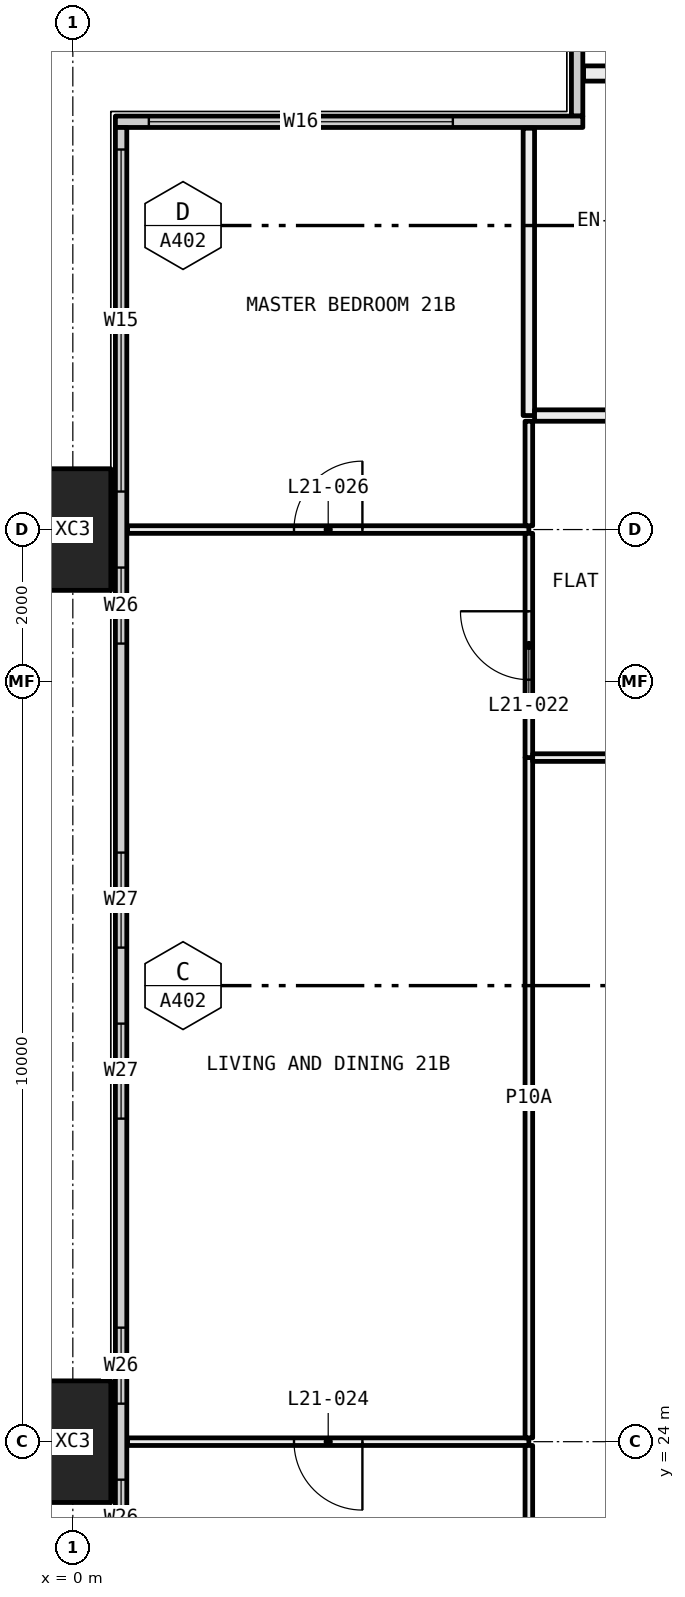
"""IFC4 building model, lengths in metres.
Left out: names, types, materials, properties, quantities, classifications, styles, units other than length and angle.
Written with IfcOpenShell. Run it as: python <this file> out.ifc"""

import sys

from ifc_helpers import new_model, si_unit, direction, frame, frame_2d, origin, origin_2d, place, context, subcontext, project, spatial, rectangle, hollow_rectangle, extrude, element, fill, save


model = new_model("IFC4")
c1 = context("Model", 3, precision=1e-05, world=origin(), true_north=direction((0.0, 1.0)))
c2 = subcontext(c1, "Body", "Model", "MODEL_VIEW")
j1 = project(units=[si_unit("LENGTHUNIT", "METRE"), si_unit("PLANEANGLEUNIT", "RADIAN")], contexts=[c1])
p1 = place(None, origin())
s1 = spatial("IfcSite", under=j1, at=p1, CompositionType="ELEMENT")
p2 = place(p1, origin())
s2 = spatial("IfcBuilding", under=s1, at=p2, CompositionType="ELEMENT")
p3 = place(p2, frame((0.0, 0.0, 85.2)))
s3 = spatial("IfcBuildingStorey", under=s2, at=p3, CompositionType="ELEMENT", Elevation=85.2)
for number, where, z_axis, x_axis in (
    (1, (0.0, 24.0, -0.4), (0.0, 0.0, 1.0), (0.0, 1.0, 0.0)),
    (2, (0.0, 36.0, -0.4), (0.0, 0.0, 1.0), (0.0, 1.0, 0.0)),
):
    element("IfcColumn", number, at=place(p3, frame(where, z_axis=z_axis, x_axis=x_axis)), inside=s3, PredefinedType="COLUMN", context=c2, shape_type="SweptSolid", body=[
        extrude(hollow_rectangle(XDim=1.6, YDim=1.0, WallThickness=0.065, at=origin_2d()), origin(), (0.0, 0.0, 1.0), 3.45),
    ])
p4 = place(p3, frame((6.635, 41.44, 0.0), z_axis=(0.0, 0.0, 1.0), x_axis=(0.0, 1.0, 0.0)))
e3 = element("IfcWall", 3, at=p4, inside=s3, PredefinedType="ELEMENTEDWALL", context=c2, shape_type="SweptSolid", body=[
    extrude(rectangle(XDim=5.85, YDim=0.15, at=frame_2d((2.925, 0.0))), origin(), (0.0, 0.0, 1.0), 3.05),
])
p5 = place(p4, frame((1.56, 0.0, 0.45)))
e4 = element("IfcOpeningElement", 4, at=p5, cuts=e3, PredefinedType="OPENING", context=c2, shape_type="SweptSolid", body=[
    extrude(rectangle(XDim=4.0, YDim=2.55, at=frame_2d((2.0, 1.275))), frame((0.0, 0.085, 0.0), z_axis=(0.0, -1.0, 0.0), x_axis=(1.0, 0.0, 0.0)), (0.0, 0.0, 1.0), 0.17),
])
p6 = place(p3, frame((0.56, 41.365, 0.0), z_axis=(0.0, 0.0, 1.0), x_axis=(1.0, 0.0, 0.0)))
e5 = element("IfcWall", 5, at=p6, inside=s3, PredefinedType="ELEMENTEDWALL", context=c2, shape_type="SweptSolid", body=[
    extrude(rectangle(XDim=6.15, YDim=0.15, at=frame_2d((3.075, 0.0))), origin(), (0.0, 0.0, 1.0), 3.05),
])
p7 = place(p6, frame((0.44, 0.0, 0.45)))
e6 = element("IfcOpeningElement", 6, at=p7, cuts=e5, PredefinedType="OPENING", context=c2, shape_type="SweptSolid", body=[
    extrude(rectangle(XDim=4.0, YDim=2.55, at=frame_2d((2.0, 1.275))), frame((0.0, 0.085, 0.0), z_axis=(0.0, -1.0, 0.0), x_axis=(1.0, 0.0, 0.0)), (0.0, 0.0, 1.0), 0.17),
])
p8 = place(p3, frame((0.635, 6.71, 0.0), z_axis=(0.0, 0.0, 1.0), x_axis=(0.0, 1.0, 0.0)))
e7 = element("IfcWall", 7, at=p8, inside=s3, PredefinedType="ELEMENTEDWALL", context=c2, shape_type="SweptSolid", body=[
    extrude(rectangle(XDim=34.58, YDim=0.15, at=frame_2d((17.29, 0.0))), origin(), (0.0, 0.0, 1.0), 3.05),
])
p9 = place(p8, frame((0.29, 0.0, 0.45)))
e8 = element("IfcOpeningElement", 8, at=p9, cuts=e7, PredefinedType="OPENING", context=c2, shape_type="SweptSolid", body=[
    extrude(rectangle(XDim=4.5, YDim=2.55, at=frame_2d((2.25, 1.275))), frame((0.0, 0.085, 0.0), z_axis=(0.0, -1.0, 0.0), x_axis=(1.0, 0.0, 0.0)), (0.0, 0.0, 1.0), 0.17),
])
p10 = place(p8, frame((5.79, 0.0, 0.45)))
e9 = element("IfcOpeningElement", 9, at=p10, cuts=e7, PredefinedType="OPENING", context=c2, shape_type="SweptSolid", body=[
    extrude(rectangle(XDim=1.0, YDim=2.55, at=frame_2d((0.5, 1.275))), frame((0.0, 0.085, 0.0), z_axis=(0.0, -1.0, 0.0), x_axis=(1.0, 0.0, 0.0)), (0.0, 0.0, 1.0), 0.17),
])
p11 = place(p8, frame((9.54, 0.0, 0.45)))
e10 = element("IfcOpeningElement", 10, at=p11, cuts=e7, PredefinedType="OPENING", context=c2, shape_type="SweptSolid", body=[
    extrude(rectangle(XDim=1.25, YDim=2.55, at=frame_2d((0.625, 1.275))), frame((0.0, 0.085, 0.0), z_axis=(0.0, -1.0, 0.0), x_axis=(1.0, 0.0, 0.0)), (0.0, 0.0, 1.0), 0.17),
])
p12 = place(p8, frame((11.79, 0.0, 0.45)))
e11 = element("IfcOpeningElement", 11, at=p12, cuts=e7, PredefinedType="OPENING", context=c2, shape_type="SweptSolid", body=[
    extrude(rectangle(XDim=1.25, YDim=2.55, at=frame_2d((0.625, 1.275))), frame((0.0, 0.085, 0.0), z_axis=(0.0, -1.0, 0.0), x_axis=(1.0, 0.0, 0.0)), (0.0, 0.0, 1.0), 0.17),
])
p13 = place(p8, frame((15.79, 0.0, 0.45)))
e12 = element("IfcOpeningElement", 12, at=p13, cuts=e7, PredefinedType="OPENING", context=c2, shape_type="SweptSolid", body=[
    extrude(rectangle(XDim=1.0, YDim=2.55, at=frame_2d((0.5, 1.275))), frame((0.0, 0.085, 0.0), z_axis=(0.0, -1.0, 0.0), x_axis=(1.0, 0.0, 0.0)), (0.0, 0.0, 1.0), 0.17),
])
p14 = place(p8, frame((17.79, 0.0, 0.45)))
e13 = element("IfcOpeningElement", 13, at=p14, cuts=e7, PredefinedType="OPENING", context=c2, shape_type="SweptSolid", body=[
    extrude(rectangle(XDim=1.0, YDim=2.55, at=frame_2d((0.5, 1.275))), frame((0.0, 0.085, 0.0), z_axis=(0.0, -1.0, 0.0), x_axis=(1.0, 0.0, 0.0)), (0.0, 0.0, 1.0), 0.17),
])
p15 = place(p8, frame((21.54, 0.0, 0.45)))
e14 = element("IfcOpeningElement", 14, at=p15, cuts=e7, PredefinedType="OPENING", context=c2, shape_type="SweptSolid", body=[
    extrude(rectangle(XDim=1.25, YDim=2.55, at=frame_2d((0.625, 1.275))), frame((0.0, 0.085, 0.0), z_axis=(0.0, -1.0, 0.0), x_axis=(1.0, 0.0, 0.0)), (0.0, 0.0, 1.0), 0.17),
])
p16 = place(p8, frame((23.79, 0.0, 0.45)))
e15 = element("IfcOpeningElement", 15, at=p16, cuts=e7, PredefinedType="OPENING", context=c2, shape_type="SweptSolid", body=[
    extrude(rectangle(XDim=1.25, YDim=2.55, at=frame_2d((0.625, 1.275))), frame((0.0, 0.085, 0.0), z_axis=(0.0, -1.0, 0.0), x_axis=(1.0, 0.0, 0.0)), (0.0, 0.0, 1.0), 0.17),
])
p17 = place(p8, frame((27.79, 0.0, 0.45)))
e16 = element("IfcOpeningElement", 16, at=p17, cuts=e7, PredefinedType="OPENING", context=c2, shape_type="SweptSolid", body=[
    extrude(rectangle(XDim=1.0, YDim=2.55, at=frame_2d((0.5, 1.275))), frame((0.0, 0.085, 0.0), z_axis=(0.0, -1.0, 0.0), x_axis=(1.0, 0.0, 0.0)), (0.0, 0.0, 1.0), 0.17),
])
p18 = place(p8, frame((29.79, 0.0, 0.45)))
e17 = element("IfcOpeningElement", 17, at=p18, cuts=e7, PredefinedType="OPENING", context=c2, shape_type="SweptSolid", body=[
    extrude(rectangle(XDim=4.5, YDim=2.55, at=frame_2d((2.25, 1.275))), frame((0.0, 0.085, 0.0), z_axis=(0.0, -1.0, 0.0), x_axis=(1.0, 0.0, 0.0)), (0.0, 0.0, 1.0), 0.17),
])
p19 = place(p3, frame((6.0, 24.0, 0.0), z_axis=(0.0, 0.0, 1.0), x_axis=(-1.0, 0.0, 0.0)))
e18 = element("IfcWall", 18, at=p19, inside=s3, PredefinedType="PARTITIONING", context=c2, shape_type="SweptSolid", body=[
    extrude(rectangle(XDim=5.28, YDim=0.1, at=frame_2d((2.64, 0.0))), origin(), (0.0, 0.0, 1.0), 2.45),
])
p20 = place(p19, frame((2.19, 0.0, 0.0)))
e19 = element("IfcOpeningElement", 19, at=p20, cuts=e18, PredefinedType="OPENING", context=c2, shape_type="SweptSolid", body=[
    extrude(rectangle(XDim=0.9, YDim=2.1, at=frame_2d((0.45, 1.05))), frame((0.0, 0.06, 0.0), z_axis=(0.0, -1.0, 0.0), x_axis=(1.0, 0.0, 0.0)), (0.0, 0.0, 1.0), 0.12),
])
p21 = place(p3, frame((6.0, 21.075, 0.0), z_axis=(0.0, 0.0, 1.0), x_axis=(0.0, 1.0, 0.0)))
e20 = element("IfcWall", 20, at=p21, inside=s3, PredefinedType="PARTITIONING", context=c2, shape_type="SweptSolid", body=[
    extrude(rectangle(XDim=2.875, YDim=0.1, at=frame_2d((1.438, 0.0))), origin(), (0.0, 0.0, 1.0), 2.45),
])
p22 = place(p3, frame((6.0, 36.0, 0.0), z_axis=(0.0, 0.0, 1.0), x_axis=(-1.0, 0.0, 0.0)))
e21 = element("IfcWall", 21, at=p22, inside=s3, PredefinedType="PARTITIONING", context=c2, shape_type="SweptSolid", body=[
    extrude(rectangle(XDim=5.28, YDim=0.1, at=frame_2d((2.64, 0.0))), origin(), (0.0, 0.0, 1.0), 2.45),
])
p23 = place(p22, frame((2.19, 0.0, 0.0)))
e22 = element("IfcOpeningElement", 22, at=p23, cuts=e21, PredefinedType="OPENING", context=c2, shape_type="SweptSolid", body=[
    extrude(rectangle(XDim=0.9, YDim=2.1, at=frame_2d((0.45, 1.05))), frame((0.0, 0.06, 0.0), z_axis=(0.0, -1.0, 0.0), x_axis=(1.0, 0.0, 0.0)), (0.0, 0.0, 1.0), 0.12),
])
p24 = place(p3, frame((6.0, 24.05, 0.0), z_axis=(0.0, 0.0, 1.0), x_axis=(0.0, 1.0, 0.0)))
e23 = element("IfcWall", 23, at=p24, inside=s3, PredefinedType="PARTITIONING", context=c2, shape_type="SweptSolid", body=[
    extrude(rectangle(XDim=8.95, YDim=0.1, at=frame_2d((4.475, 0.0))), origin(), (0.0, 0.0, 1.0), 2.45),
])
p25 = place(p3, frame((6.0, 33.0, 0.0), z_axis=(0.0, 0.0, 1.0), x_axis=(0.0, 1.0, 0.0)))
e24 = element("IfcWall", 24, at=p25, inside=s3, PredefinedType="PARTITIONING", context=c2, shape_type="SweptSolid", body=[
    extrude(rectangle(XDim=2.95, YDim=0.1, at=frame_2d((1.475, 0.0))), origin(), (0.0, 0.0, 1.0), 2.45),
])
p26 = place(p25, frame((1.025, 0.0, 0.0)))
e25 = element("IfcOpeningElement", 25, at=p26, cuts=e24, PredefinedType="OPENING", context=c2, shape_type="SweptSolid", body=[
    extrude(rectangle(XDim=0.9, YDim=2.1, at=frame_2d((0.45, 1.05))), frame((0.0, 0.06, 0.0), z_axis=(0.0, -1.0, 0.0), x_axis=(1.0, 0.0, 0.0)), (0.0, 0.0, 1.0), 0.12),
])
p27 = place(p3, frame((6.0, 36.05, 0.0), z_axis=(0.0, 0.0, 1.0), x_axis=(0.0, 1.0, 0.0)))
e26 = element("IfcWall", 26, at=p27, inside=s3, PredefinedType="PARTITIONING", context=c2, shape_type="SweptSolid", body=[
    extrude(rectangle(XDim=1.375, YDim=0.1, at=frame_2d((0.688, 0.0))), origin(), (0.0, 0.0, 1.0), 2.45),
])
p28 = place(p3, frame((6.0, 37.5, 0.0), z_axis=(0.0, 0.0, 1.0), x_axis=(0.0, 1.0, 0.0)))
e27 = element("IfcWall", 27, at=p28, inside=s3, PredefinedType="PARTITIONING", context=c2, shape_type="SweptSolid", body=[
    extrude(rectangle(XDim=3.78, YDim=0.15, at=frame_2d((1.89, 0.0))), origin(), (0.0, 0.0, 1.0), 3.05),
])
p29 = place(p3, frame((10.0, 33.0, 0.0), z_axis=(0.0, 0.0, 1.0), x_axis=(-1.0, 0.0, 0.0)))
e28 = element("IfcWall", 28, at=p29, inside=s3, PredefinedType="PARTITIONING", context=c2, shape_type="SweptSolid", body=[
    extrude(rectangle(XDim=3.95, YDim=0.1, at=frame_2d((1.975, 0.0))), origin(), (0.0, 0.0, 1.0), 3.05),
])
p30 = place(p29, frame((1.525, 0.0, 0.0)))
e29 = element("IfcOpeningElement", 29, at=p30, cuts=e28, PredefinedType="OPENING", context=c2, shape_type="SweptSolid", body=[
    extrude(rectangle(XDim=0.9, YDim=2.1, at=frame_2d((0.45, 1.05))), frame((0.0, 0.06, 0.0), z_axis=(0.0, -1.0, 0.0), x_axis=(1.0, 0.0, 0.0)), (0.0, 0.0, 1.0), 0.12),
])
p31 = place(p3, frame((10.0, 37.5, 0.0), z_axis=(0.0, 0.0, 1.0), x_axis=(-1.0, 0.0, 0.0)))
e30 = element("IfcWall", 30, at=p31, inside=s3, PredefinedType="PARTITIONING", context=c2, shape_type="SweptSolid", body=[
    extrude(rectangle(XDim=3.925, YDim=0.15, at=frame_2d((1.962, 0.0))), origin(), (0.0, 0.0, 1.0), 3.05),
])
p32 = place(p31, frame((1.512, 0.0, 0.0)))
e31 = element("IfcOpeningElement", 31, at=p32, cuts=e30, PredefinedType="OPENING", context=c2, shape_type="SweptSolid", body=[
    extrude(rectangle(XDim=0.9, YDim=2.1, at=frame_2d((0.45, 1.05))), frame((0.0, 0.085, 0.0), z_axis=(0.0, -1.0, 0.0), x_axis=(1.0, 0.0, 0.0)), (0.0, 0.0, 1.0), 0.17),
])
p33 = place(p3, frame((10.1, 42.0, 0.0), z_axis=(0.0, 0.0, 1.0), x_axis=(-1.0, 0.0, 0.0)))
e32 = element("IfcWall", 32, at=p33, inside=s3, PredefinedType="PARTITIONING", context=c2, shape_type="SweptSolid", body=[
    extrude(rectangle(XDim=3.38, YDim=0.2, at=frame_2d((1.69, 0.0))), origin(), (0.0, 0.0, 1.0), 3.05),
])
p34 = place(p7, origin())
e33 = element("IfcWindow", 33, at=p34, inside=s3, PartitioningType="SINGLE_PANEL", PredefinedType="WINDOW", context=c2, shape_type="SweptSolid", body=[
    extrude(rectangle(XDim=4.0, YDim=2.55, at=frame_2d((2.0, 1.275))), frame((0.0, 0.03, 0.0), z_axis=(0.0, -1.0, 0.0), x_axis=(1.0, 0.0, 0.0)), (0.0, 0.0, 1.0), 0.06),
])
fill(e6, e33)
p35 = place(p13, origin())
e34 = element("IfcWindow", 34, at=p35, inside=s3, PartitioningType="SINGLE_PANEL", PredefinedType="WINDOW", context=c2, shape_type="SweptSolid", body=[
    extrude(rectangle(XDim=1.0, YDim=2.55, at=frame_2d((0.5, 1.275))), frame((0.0, 0.03, 0.0), z_axis=(0.0, -1.0, 0.0), x_axis=(1.0, 0.0, 0.0)), (0.0, 0.0, 1.0), 0.06),
])
fill(e12, e34)
p36 = place(p14, origin())
e35 = element("IfcWindow", 35, at=p36, inside=s3, PartitioningType="SINGLE_PANEL", PredefinedType="WINDOW", context=c2, shape_type="SweptSolid", body=[
    extrude(rectangle(XDim=1.0, YDim=2.55, at=frame_2d((0.5, 1.275))), frame((0.0, 0.03, 0.0), z_axis=(0.0, -1.0, 0.0), x_axis=(1.0, 0.0, 0.0)), (0.0, 0.0, 1.0), 0.06),
])
fill(e13, e35)
p37 = place(p15, origin())
e36 = element("IfcWindow", 36, at=p37, inside=s3, PartitioningType="SINGLE_PANEL", PredefinedType="WINDOW", context=c2, shape_type="SweptSolid", body=[
    extrude(rectangle(XDim=1.25, YDim=2.55, at=frame_2d((0.625, 1.275))), frame((0.0, 0.03, 0.0), z_axis=(0.0, -1.0, 0.0), x_axis=(1.0, 0.0, 0.0)), (0.0, 0.0, 1.0), 0.06),
])
fill(e14, e36)
p38 = place(p16, origin())
e37 = element("IfcWindow", 37, at=p38, inside=s3, PartitioningType="SINGLE_PANEL", PredefinedType="WINDOW", context=c2, shape_type="SweptSolid", body=[
    extrude(rectangle(XDim=1.25, YDim=2.55, at=frame_2d((0.625, 1.275))), frame((0.0, 0.03, 0.0), z_axis=(0.0, -1.0, 0.0), x_axis=(1.0, 0.0, 0.0)), (0.0, 0.0, 1.0), 0.06),
])
fill(e15, e37)
p39 = place(p17, origin())
e38 = element("IfcWindow", 38, at=p39, inside=s3, PartitioningType="SINGLE_PANEL", PredefinedType="WINDOW", context=c2, shape_type="SweptSolid", body=[
    extrude(rectangle(XDim=1.0, YDim=2.55, at=frame_2d((0.5, 1.275))), frame((0.0, 0.03, 0.0), z_axis=(0.0, -1.0, 0.0), x_axis=(1.0, 0.0, 0.0)), (0.0, 0.0, 1.0), 0.06),
])
fill(e16, e38)
p40 = place(p18, origin())
e39 = element("IfcWindow", 39, at=p40, inside=s3, PartitioningType="SINGLE_PANEL", PredefinedType="WINDOW", context=c2, shape_type="SweptSolid", body=[
    extrude(rectangle(XDim=4.5, YDim=2.55, at=frame_2d((2.25, 1.275))), frame((0.0, 0.03, 0.0), z_axis=(0.0, -1.0, 0.0), x_axis=(1.0, 0.0, 0.0)), (0.0, 0.0, 1.0), 0.06),
])
fill(e17, e39)
p41 = place(p26, origin())
e40 = element("IfcDoor", 40, at=p41, inside=s3, OperationType="SINGLE_SWING_LEFT", PredefinedType="DOOR", context=c2, shape_type="SweptSolid", body=[
    extrude(rectangle(XDim=0.9, YDim=2.1, at=frame_2d((0.45, 1.05))), frame((0.0, 0.025, 0.0), z_axis=(0.0, -1.0, 0.0), x_axis=(1.0, 0.0, 0.0)), (0.0, 0.0, 1.0), 0.05),
])
fill(e25, e40)
p42 = place(p20, origin())
e41 = element("IfcDoor", 41, at=p42, inside=s3, OperationType="SINGLE_SWING_RIGHT", PredefinedType="DOOR", context=c2, shape_type="SweptSolid", body=[
    extrude(rectangle(XDim=0.9, YDim=2.1, at=frame_2d((0.45, 1.05))), frame((0.0, 0.025, 0.0), z_axis=(0.0, -1.0, 0.0), x_axis=(1.0, 0.0, 0.0)), (0.0, 0.0, 1.0), 0.05),
])
fill(e19, e41)
p43 = place(p23, frame((0.9, 0.0, 0.0), x_axis=(-1.0, 0.0, 0.0)))
e42 = element("IfcDoor", 42, at=p43, inside=s3, OperationType="SINGLE_SWING_LEFT", PredefinedType="DOOR", context=c2, shape_type="SweptSolid", body=[
    extrude(rectangle(XDim=0.9, YDim=2.1, at=frame_2d((0.45, 1.05))), frame((0.0, 0.025, 0.0), z_axis=(0.0, -1.0, 0.0), x_axis=(1.0, 0.0, 0.0)), (0.0, 0.0, 1.0), 0.05),
])
fill(e22, e42)
save(model, sys.argv[1])
